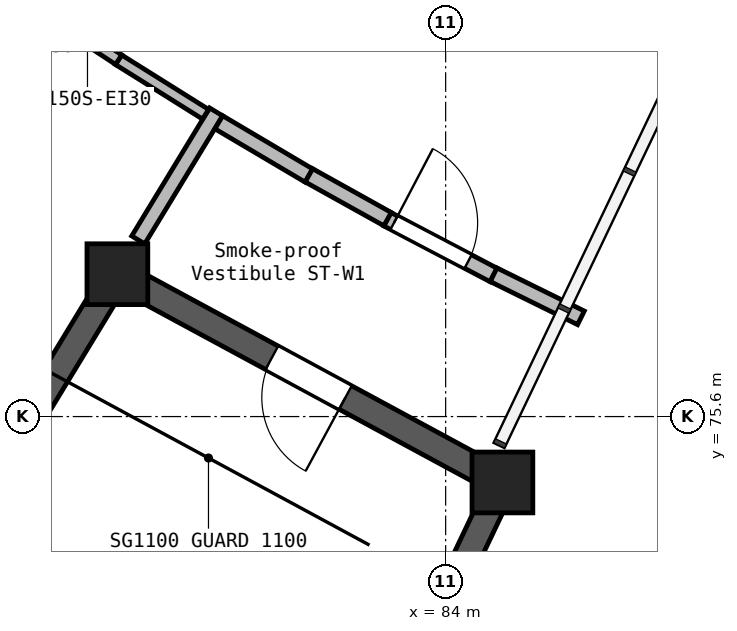
"""IFC4 building model, lengths in metres.
Left out: names, types, materials, properties, quantities, classifications, styles, units other than length and angle.
Written with IfcOpenShell. Run it as: python <this file> out.ifc"""

import sys

from ifc_helpers import new_model, si_unit, direction, frame, frame_2d, origin, origin_2d, place, context, subcontext, project, spatial, rectangle, extrude, element, fill, save


model = new_model("IFC4")
c1 = context("Model", 3, precision=1e-05, world=origin(), true_north=direction((0.0, 1.0)))
c2 = subcontext(c1, "Body", "Model", "MODEL_VIEW")
j1 = project(units=[si_unit("LENGTHUNIT", "METRE"), si_unit("PLANEANGLEUNIT", "RADIAN")], contexts=[c1])
p1 = place(None, origin())
s1 = spatial("IfcSite", under=j1, at=p1, CompositionType="ELEMENT")
p2 = place(p1, origin())
s2 = spatial("IfcBuilding", under=s1, at=p2, CompositionType="ELEMENT")
p3 = place(p2, frame((0.0, 0.0, 16.8)))
s3 = spatial("IfcBuildingStorey", under=s2, at=p3, CompositionType="ELEMENT", Elevation=16.8)
for number, where, z_axis, x_axis in (
    (1, (79.681, 77.473, 0.0), (0.0, 0.0, 1.0), (1.0, 0.0, 0.0)),
    (2, (84.747, 74.733, 0.0), (0.0, 0.0, 1.0), (1.0, 0.0, 0.0)),
):
    element("IfcColumn", number, at=place(p3, frame(where, z_axis=z_axis, x_axis=x_axis)), inside=s3, PredefinedType="COLUMN", context=c2, shape_type="SweptSolid", body=[
        extrude(rectangle(XDim=0.8, YDim=0.8, at=origin_2d()), origin(), (0.0, 0.0, 1.0), 4.2),
    ])
p4 = place(p3, frame((75.848, 71.173, 0.0), z_axis=(0.0, 0.0, 1.0), x_axis=(0.51973149438, 0.854329663391, 0.0)))
e3 = element("IfcWall", 3, at=p4, inside=s3, PredefinedType="SHEAR", context=c2, shape_type="SweptSolid", body=[
    extrude(rectangle(XDim=7.55, YDim=0.35, at=frame_2d((3.775, 0.0))), origin(), (0.0, 0.0, 1.0), 4.2),
])
p5 = place(p3, frame((81.572, 68.077, 0.0), z_axis=(0.0, 0.0, 1.0), x_axis=(0.430592498036, 0.90254645345, 0.0)))
e4 = element("IfcWall", 4, at=p5, inside=s3, PredefinedType="SHEAR", context=c2, shape_type="SweptSolid", body=[
    extrude(rectangle(XDim=7.55, YDim=0.35, at=frame_2d((3.775, 0.0))), origin(), (0.0, 0.0, 1.0), 4.2),
])
p6 = place(p3, frame((84.593, 74.816, 0.0), z_axis=(0.0, 0.0, 1.0), x_axis=(-0.879585553739, 0.475740742058, 0.0)))
e5 = element("IfcWall", 5, at=p6, inside=s3, PredefinedType="SHEAR", context=c2, shape_type="SweptSolid", body=[
    extrude(rectangle(XDim=5.409, YDim=0.35, at=frame_2d((2.705, 0.0))), origin(), (0.0, 0.0, 1.0), 4.2),
])
p7 = place(p6, frame((2.174, 0.0, 0.0)))
e6 = element("IfcOpeningElement", 6, at=p7, cuts=e5, PredefinedType="OPENING", context=c2, shape_type="SweptSolid", body=[
    extrude(rectangle(XDim=1.1, YDim=2.1, at=frame_2d((0.55, 1.05))), frame((0.0, 0.185, 0.0), z_axis=(0.0, -1.0, 0.0), x_axis=(1.0, 0.0, 0.0)), (0.0, 0.0, 1.0), 0.37),
])
p8 = place(p3, frame((79.955, 77.924, 0.0), z_axis=(0.0, 0.0, 1.0), x_axis=(0.519675881268, 0.85436349315, 0.0)))
e7 = element("IfcWall", 7, at=p8, inside=s3, PredefinedType="SOLIDWALL", context=c2, shape_type="SweptSolid", body=[
    extrude(rectangle(XDim=1.972, YDim=0.2, at=frame_2d((0.986, 0.0))), origin(), (0.0, 0.0, 1.0), 3.9),
])
p9 = place(p3, frame((83.232, 78.197, 0.0), z_axis=(0.0, 0.0, 1.0), x_axis=(0.885510751813, -0.464618885134, 0.0)))
e8 = element("IfcWall", 8, at=p9, inside=s3, PredefinedType="SOLIDWALL", context=c2, shape_type="SweptSolid", body=[
    extrude(rectangle(XDim=1.58, YDim=0.2, at=frame_2d((0.79, 0.0))), origin(), (0.0, 0.0, 1.0), 3.9),
])
p10 = place(p9, frame((0.1, 0.0, 0.0)))
e9 = element("IfcOpeningElement", 9, at=p10, cuts=e8, PredefinedType="OPENING", context=c2, shape_type="SweptSolid", body=[
    extrude(rectangle(XDim=1.1, YDim=2.1, at=frame_2d((0.55, 1.05))), frame((0.0, 0.11, 0.0), z_axis=(0.0, -1.0, 0.0), x_axis=(1.0, 0.0, 0.0)), (0.0, 0.0, 1.0), 0.22),
])
p11 = place(p3, frame((81.015, 79.471, 0.0), z_axis=(0.0, 0.0, 1.0), x_axis=(0.860926528214, -0.508729312127, 0.0)))
e10 = element("IfcWall", 10, at=p11, inside=s3, PredefinedType="SOLIDWALL", context=c2, shape_type="SweptSolid", body=[
    extrude(rectangle(XDim=1.379, YDim=0.2, at=frame_2d((0.689, 0.0))), origin(), (0.0, 0.0, 1.0), 3.9),
])
p12 = place(p3, frame((84.631, 77.466, 0.0), z_axis=(0.0, 0.0, 1.0), x_axis=(0.896852237177, -0.442330266509, 0.0)))
e11 = element("IfcWall", 11, at=p12, inside=s3, PredefinedType="SOLIDWALL", context=c2, shape_type="SweptSolid", body=[
    extrude(rectangle(XDim=1.281, YDim=0.2, at=frame_2d((0.641, 0.0))), origin(), (0.0, 0.0, 1.0), 2.947),
])
p13 = place(p3, frame((82.201, 78.774, 0.0), z_axis=(0.0, 0.0, 1.0), x_axis=(0.873621822139, -0.486605499232, 0.0)))
e12 = element("IfcWall", 12, at=p13, inside=s3, PredefinedType="SOLIDWALL", context=c2, shape_type="SweptSolid", body=[
    extrude(rectangle(XDim=1.184, YDim=0.2, at=frame_2d((0.592, 0.0))), origin(), (0.0, 0.0, 1.0), 3.9),
])
p14 = place(p3, frame((79.695, 80.295, 0.0), z_axis=(0.0, 0.0, 1.0), x_axis=(0.847541618724, -0.530728936964, 0.0)))
e13 = element("IfcWall", 13, at=p14, inside=s3, PredefinedType="PARTITIONING", context=c2, shape_type="SweptSolid", body=[
    extrude(rectangle(XDim=1.353, YDim=0.15, at=frame_2d((0.676, 0.0))), origin(), (0.0, 0.0, 1.0), 3.9),
])
p15 = place(p3, frame((78.877, 80.836, 0.0), z_axis=(0.0, 0.0, 1.0), x_axis=(0.835209839134, -0.549931381733, 0.0)))
e14 = element("IfcWall", 14, at=p15, inside=s3, PredefinedType="PARTITIONING", context=c2, shape_type="SweptSolid", body=[
    extrude(rectangle(XDim=0.982, YDim=0.15, at=frame_2d((0.491, 0.0))), origin(), (0.0, 0.0, 1.0), 3.9),
])
p16 = place(p7, origin())
e15 = element("IfcDoor", 15, at=p16, inside=s3, OperationType="SINGLE_SWING_RIGHT", PredefinedType="DOOR", context=c2, shape_type="SweptSolid", body=[
    extrude(rectangle(XDim=1.1, YDim=2.1, at=frame_2d((0.55, 1.05))), frame((0.0, 0.025, 0.0), z_axis=(0.0, -1.0, 0.0), x_axis=(1.0, 0.0, 0.0)), (0.0, 0.0, 1.0), 0.05),
])
fill(e6, e15)
p17 = place(p10, frame((1.1, 0.0, 0.0), z_axis=(0.0, 0.0, 1.0), x_axis=(-1.0, 0.0, 0.0)))
e16 = element("IfcDoor", 16, at=p17, inside=s3, OperationType="SINGLE_SWING_RIGHT", PredefinedType="DOOR", context=c2, shape_type="SweptSolid", body=[
    extrude(rectangle(XDim=1.1, YDim=2.1, at=frame_2d((0.55, 1.05))), frame((0.0, 0.025, 0.0), z_axis=(0.0, -1.0, 0.0), x_axis=(1.0, 0.0, 0.0)), (0.0, 0.0, 1.0), 0.05),
])
fill(e9, e16)
save(model, sys.argv[1])
